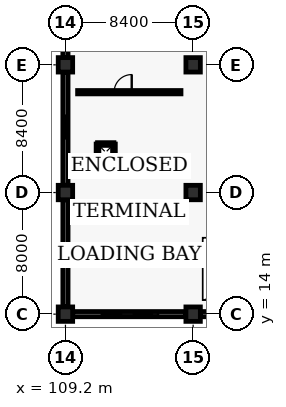
"""IFC4 building model, lengths in metres.
Left out: names, types, materials, properties, quantities, classifications, styles, units other than length and angle.
Written with IfcOpenShell. Run it as: python <this file> out.ifc"""

import sys

from ifc_helpers import new_model, si_unit, direction, frame, frame_2d, origin, origin_2d, place, context, subcontext, project, spatial, rectangle, extrude, element, fill, save


model = new_model("IFC4")
c1 = context("Model", 3, precision=1e-05, world=origin(), true_north=direction((0.0, 1.0)))
c2 = subcontext(c1, "Body", "Model", "MODEL_VIEW")
j1 = project(units=[si_unit("LENGTHUNIT", "METRE"), si_unit("PLANEANGLEUNIT", "RADIAN")], contexts=[c1])
p1 = place(None, origin())
s1 = spatial("IfcSite", under=j1, at=p1, CompositionType="ELEMENT")
p2 = place(p1, origin())
s2 = spatial("IfcBuilding", under=s1, at=p2, CompositionType="ELEMENT")
p3 = place(p2, origin())
s3 = spatial("IfcBuildingStorey", under=s2, at=p3, CompositionType="ELEMENT", Elevation=0.0)
for number, where, z_axis, x_axis in (
    (1, (109.2, 14.0, -0.46), (0.0, 0.0, 1.0), (1.0, 0.0, 0.0)),
    (2, (109.2, 22.0, -0.46), (0.0, 0.0, 1.0), (1.0, 0.0, 0.0)),
    (3, (109.2, 30.4, -0.46), (0.0, 0.0, 1.0), (1.0, 0.0, 0.0)),
    (4, (117.6, 14.0, -0.46), (0.0, 0.0, 1.0), (1.0, 0.0, 0.0)),
    (5, (117.6, 22.0, -0.46), (0.0, 0.0, 1.0), (1.0, 0.0, 0.0)),
    (6, (117.6, 30.4, -0.46), (0.0, 0.0, 1.0), (1.0, 0.0, 0.0)),
):
    element("IfcColumn", number, at=place(p3, frame(where, z_axis=z_axis, x_axis=x_axis)), inside=s3, PredefinedType="COLUMN", context=c2, shape_type="SweptSolid", body=[
        extrude(rectangle(XDim=0.95, YDim=0.95, at=origin_2d()), origin(), (0.0, 0.0, 1.0), 5.9),
    ])
p4 = place(p3, frame((109.675, 14.0, 0.0), z_axis=(0.0, 0.0, 1.0), x_axis=(1.0, 0.0, 0.0)))
e7 = element("IfcWall", 7, at=p4, inside=s3, PredefinedType="SOLIDWALL", context=c2, shape_type="SweptSolid", body=[
    extrude(rectangle(XDim=7.45, YDim=0.34, at=frame_2d((3.725, 0.0))), origin(), (0.0, 0.0, 1.0), 4.545),
])
p5 = place(p4, frame((1.915, 0.0, 0.0)))
e8 = element("IfcOpeningElement", 8, at=p5, cuts=e7, PredefinedType="OPENING", context=c2, shape_type="SweptSolid", body=[
    extrude(rectangle(XDim=3.7, YDim=4.1, at=frame_2d((1.85, 2.05))), frame((0.0, 0.18, 0.0), z_axis=(0.0, -1.0, 0.0), x_axis=(1.0, 0.0, 0.0)), (0.0, 0.0, 1.0), 0.36),
])
p6 = place(p3, frame((118.075, 14.0, 0.0), z_axis=(0.0, 0.0, 1.0), x_axis=(1.0, 0.0, 0.0)))
e9 = element("IfcWall", 9, at=p6, inside=s3, PredefinedType="SOLIDWALL", context=c2, shape_type="SweptSolid", body=[
    extrude(rectangle(XDim=7.45, YDim=0.34, at=frame_2d((3.725, 0.0))), origin(), (0.0, 0.0, 1.0), 4.545),
])
p7 = place(p6, frame((1.715, 0.0, 0.0)))
e10 = element("IfcOpeningElement", 10, at=p7, cuts=e9, PredefinedType="OPENING", context=c2, shape_type="SweptSolid", body=[
    extrude(rectangle(XDim=4.2, YDim=4.3, at=frame_2d((2.1, 2.15))), frame((0.0, 0.18, 0.0), z_axis=(0.0, -1.0, 0.0), x_axis=(1.0, 0.0, 0.0)), (0.0, 0.0, 1.0), 0.36),
])
p8 = place(p3, frame((109.2, 21.525, 0.0), z_axis=(0.0, 0.0, 1.0), x_axis=(0.0, -1.0, 0.0)))
e11 = element("IfcWall", 11, at=p8, inside=s3, PredefinedType="SOLIDWALL", context=c2, shape_type="SweptSolid", body=[
    extrude(rectangle(XDim=7.05, YDim=0.34, at=frame_2d((3.525, 0.0))), origin(), (0.0, 0.0, 1.0), 4.545),
])
p9 = place(p8, frame((2.865, 0.0, 1.35)))
e12 = element("IfcOpeningElement", 12, at=p9, cuts=e11, PredefinedType="OPENING", context=c2, shape_type="SweptSolid", body=[
    extrude(rectangle(XDim=1.5, YDim=1.1, at=frame_2d((0.75, 0.55))), frame((0.0, 0.18, 0.0), z_axis=(0.0, -1.0, 0.0), x_axis=(1.0, 0.0, 0.0)), (0.0, 0.0, 1.0), 0.36),
])
p10 = place(p3, frame((109.2, 29.925, 0.0), z_axis=(0.0, 0.0, 1.0), x_axis=(0.0, -1.0, 0.0)))
e13 = element("IfcWall", 13, at=p10, inside=s3, PredefinedType="SOLIDWALL", context=c2, shape_type="SweptSolid", body=[
    extrude(rectangle(XDim=7.45, YDim=0.34, at=frame_2d((3.725, 0.0))), origin(), (0.0, 0.0, 1.0), 4.545),
])
p11 = place(p10, frame((2.865, 0.0, 1.35)))
e14 = element("IfcOpeningElement", 14, at=p11, cuts=e13, PredefinedType="OPENING", context=c2, shape_type="SweptSolid", body=[
    extrude(rectangle(XDim=1.5, YDim=1.1, at=frame_2d((0.75, 0.55))), frame((0.0, 0.18, 0.0), z_axis=(0.0, -1.0, 0.0), x_axis=(1.0, 0.0, 0.0)), (0.0, 0.0, 1.0), 0.36),
])
p12 = place(p3, frame((109.2, 38.325, 0.0), z_axis=(0.0, 0.0, 1.0), x_axis=(0.0, -1.0, 0.0)))
e15 = element("IfcWall", 15, at=p12, inside=s3, PredefinedType="SOLIDWALL", context=c2, shape_type="SweptSolid", body=[
    extrude(rectangle(XDim=7.45, YDim=0.34, at=frame_2d((3.725, 0.0))), origin(), (0.0, 0.0, 1.0), 4.545),
])
p13 = place(p12, frame((2.865, 0.0, 1.35)))
e16 = element("IfcOpeningElement", 16, at=p13, cuts=e15, PredefinedType="OPENING", context=c2, shape_type="SweptSolid", body=[
    extrude(rectangle(XDim=1.5, YDim=1.1, at=frame_2d((0.75, 0.55))), frame((0.0, 0.18, 0.0), z_axis=(0.0, -1.0, 0.0), x_axis=(1.0, 0.0, 0.0)), (0.0, 0.0, 1.0), 0.36),
])
for number, where, z_axis, x_axis in (
    (17, (111.31, 24.11, 0.0), (0.0, 0.0, 1.0), (1.0, 0.0, 0.0)),
    (18, (112.39, 24.11, 0.0), (0.0, 0.0, 1.0), (0.0, 1.0, 0.0)),
    (19, (112.39, 25.19, 0.0), (0.0, 0.0, 1.0), (-1.0, 0.0, 0.0)),
    (20, (111.31, 25.19, 0.0), (0.0, 0.0, 1.0), (0.0, -1.0, 0.0)),
):
    element("IfcWall", number, at=place(p3, frame(where, z_axis=z_axis, x_axis=x_axis)), inside=s3, PredefinedType="SOLIDWALL", context=c2, shape_type="SweptSolid", body=[
        extrude(rectangle(XDim=1.08, YDim=0.18, at=frame_2d((0.54, 0.0))), origin(), (0.0, 0.0, 1.0), 2.6),
    ])
p14 = place(p3, frame((110.0, 28.6, 0.0), z_axis=(0.0, 0.0, 1.0), x_axis=(1.0, 0.0, 0.0)))
e21 = element("IfcWall", 21, at=p14, inside=s3, PredefinedType="SOLIDWALL", context=c2, shape_type="SweptSolid", body=[
    extrude(rectangle(XDim=6.8, YDim=0.22, at=frame_2d((3.4, 0.0))), origin(), (0.0, 0.0, 1.0), 3.2),
])
p15 = place(p14, frame((2.4, 0.0, 0.0)))
e22 = element("IfcOpeningElement", 22, at=p15, cuts=e21, PredefinedType="OPENING", context=c2, shape_type="SweptSolid", body=[
    extrude(rectangle(XDim=1.16, YDim=2.14, at=frame_2d((0.58, 1.07))), frame((0.0, 0.12, 0.0), z_axis=(0.0, -1.0, 0.0), x_axis=(1.0, 0.0, 0.0)), (0.0, 0.0, 1.0), 0.24),
])
p16 = place(p5, origin())
e23 = element("IfcDoor", 23, at=p16, inside=s3, OperationType="ROLLINGUP", PredefinedType="GATE", context=c2, shape_type="SweptSolid", body=[
    extrude(rectangle(XDim=3.7, YDim=4.1, at=frame_2d((1.85, 2.05))), frame((0.0, 0.025, 0.0), z_axis=(0.0, -1.0, 0.0), x_axis=(1.0, 0.0, 0.0)), (0.0, 0.0, 1.0), 0.05),
])
fill(e8, e23)
p17 = place(p9, origin())
e24 = element("IfcWindow", 24, at=p17, inside=s3, PartitioningType="SINGLE_PANEL", PredefinedType="WINDOW", context=c2, shape_type="SweptSolid", body=[
    extrude(rectangle(XDim=1.5, YDim=1.1, at=frame_2d((0.75, 0.55))), frame((0.0, 0.03, 0.0), z_axis=(0.0, -1.0, 0.0), x_axis=(1.0, 0.0, 0.0)), (0.0, 0.0, 1.0), 0.06),
])
fill(e12, e24)
p18 = place(p11, origin())
e25 = element("IfcWindow", 25, at=p18, inside=s3, PartitioningType="SINGLE_PANEL", PredefinedType="WINDOW", context=c2, shape_type="SweptSolid", body=[
    extrude(rectangle(XDim=1.5, YDim=1.1, at=frame_2d((0.75, 0.55))), frame((0.0, 0.03, 0.0), z_axis=(0.0, -1.0, 0.0), x_axis=(1.0, 0.0, 0.0)), (0.0, 0.0, 1.0), 0.06),
])
fill(e14, e25)
p19 = place(p15, origin())
e26 = element("IfcDoor", 26, at=p19, inside=s3, OperationType="SINGLE_SWING_RIGHT", PredefinedType="DOOR", context=c2, shape_type="SweptSolid", body=[
    extrude(rectangle(XDim=1.16, YDim=2.14, at=frame_2d((0.58, 1.07))), frame((0.0, 0.025, 0.0), z_axis=(0.0, -1.0, 0.0), x_axis=(1.0, 0.0, 0.0)), (0.0, 0.0, 1.0), 0.05),
])
fill(e22, e26)
save(model, sys.argv[1])
